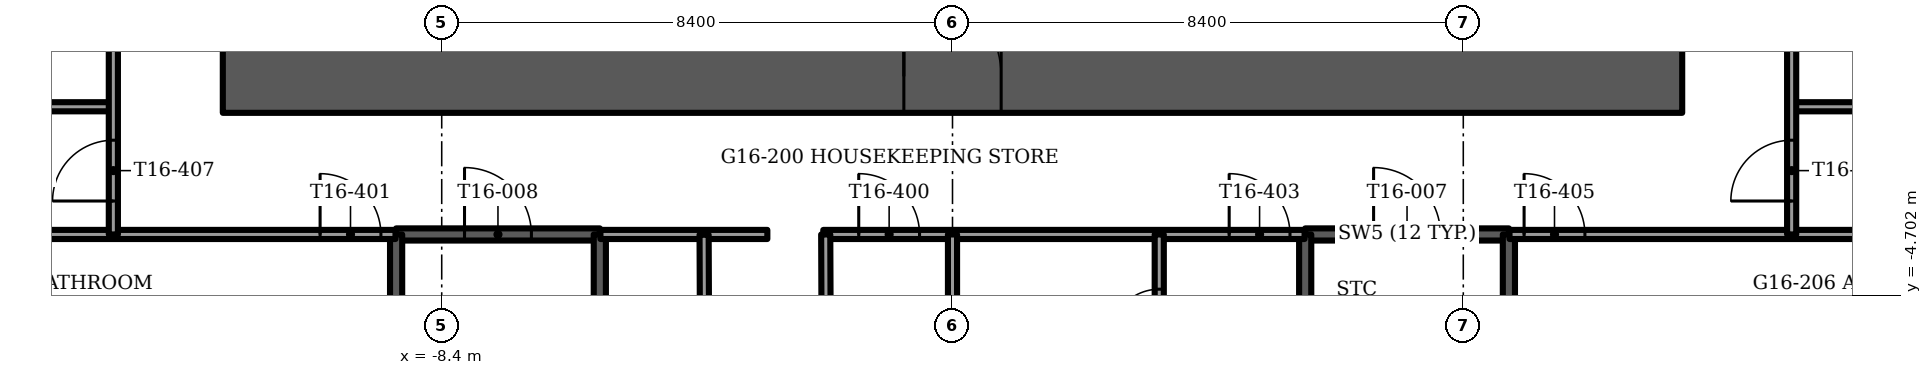
"""IFC4 building model, lengths in metres.
Left out: names, types, materials, properties, quantities, classifications, styles, units other than length and angle.
Written with IfcOpenShell. Run it as: python <this file> out.ifc"""

import sys

from ifc_helpers import new_model, si_unit, direction, frame, frame_2d, origin, place, context, subcontext, project, spatial, rectangle, extrude, element, fill, save


model = new_model("IFC4")
c1 = context("Model", 3, precision=1e-05, world=origin(), true_north=direction((0.0, 1.0)))
c2 = subcontext(c1, "Body", "Model", "MODEL_VIEW")
j1 = project(units=[si_unit("LENGTHUNIT", "METRE"), si_unit("PLANEANGLEUNIT", "RADIAN")], contexts=[c1])
p1 = place(None, origin())
s1 = spatial("IfcSite", under=j1, at=p1, CompositionType="ELEMENT")
p2 = place(p1, origin())
s2 = spatial("IfcBuilding", under=s1, at=p2, CompositionType="ELEMENT")
p3 = place(p2, frame((0.0, 0.0, 65.5)))
s3 = spatial("IfcBuildingStorey", under=s2, at=p3, CompositionType="ELEMENT", Elevation=65.5)
p4 = place(p3, frame((-12.0, -1.1, -0.3), z_axis=(0.0, 0.0, 1.0), x_axis=(1.0, 0.0, 0.0)))
e1 = element("IfcWall", 1, at=p4, inside=s3, PredefinedType="SHEAR", context=c2, shape_type="SweptSolid", body=[
    extrude(rectangle(XDim=24.0, YDim=1.2, at=frame_2d((12.0, 0.0))), origin(), (0.0, 0.0, 1.0), 3.75),
])
p5 = place(p4, frame((11.2, 0.0, 0.0)))
e2 = element("IfcOpeningElement", 2, at=p5, cuts=e1, PredefinedType="OPENING", context=c2, shape_type="SweptSolid", body=[
    extrude(rectangle(XDim=1.6, YDim=2.1, at=frame_2d((0.8, 1.05))), frame((0.0, 0.6, 0.0), z_axis=(0.0, -1.0, 0.0), x_axis=(1.0, 0.0, 0.0)), (0.0, 0.0, 1.0), 1.2),
])
p6 = place(p3, frame((-20.496, -1.351, 0.0), z_axis=(0.0, 0.0, 1.0), x_axis=(0.500010091595, -0.866019577321, 0.0)))
e3 = element("IfcWall", 3, at=p6, inside=s3, PredefinedType="SOLIDWALL", context=c2, shape_type="SweptSolid", body=[
    extrude(rectangle(XDim=11.633, YDim=0.15, at=frame_2d((5.816, 0.0))), origin(), (0.0, 0.0, 1.0), 3.45),
])
p7 = place(p6, frame((0.978, 0.0, 0.15)))
e4 = element("IfcOpeningElement", 4, at=p7, cuts=e3, PredefinedType="OPENING", context=c2, shape_type="SweptSolid", body=[
    extrude(rectangle(XDim=0.9, YDim=2.2, at=frame_2d((0.45, 1.1))), frame((0.0, 0.075, 0.0), z_axis=(0.0, -1.0, 0.0), x_axis=(1.0, 0.0, 0.0)), (0.0, 0.0, 1.0), 0.15),
])
p8 = place(p6, frame((3.078, 0.0, 0.15)))
e5 = element("IfcOpeningElement", 5, at=p8, cuts=e3, PredefinedType="OPENING", context=c2, shape_type="SweptSolid", body=[
    extrude(rectangle(XDim=1.5, YDim=2.2, at=frame_2d((0.75, 1.1))), frame((0.0, 0.075, 0.0), z_axis=(0.0, -1.0, 0.0), x_axis=(1.0, 0.0, 0.0)), (0.0, 0.0, 1.0), 0.15),
])
p9 = place(p6, frame((6.501, 0.0, 0.15)))
e6 = element("IfcOpeningElement", 6, at=p9, cuts=e3, PredefinedType="OPENING", context=c2, shape_type="SweptSolid", body=[
    extrude(rectangle(XDim=1.8, YDim=2.2, at=frame_2d((0.9, 1.1))), frame((0.0, 0.075, 0.0), z_axis=(0.0, -1.0, 0.0), x_axis=(1.0, 0.0, 0.0)), (0.0, 0.0, 1.0), 0.15),
])
p10 = place(p3, frame((14.679, -11.425, 0.0), z_axis=(0.0, 0.0, 1.0), x_axis=(0.500010091595, 0.866019577321, 0.0)))
e7 = element("IfcWall", 7, at=p10, inside=s3, PredefinedType="SOLIDWALL", context=c2, shape_type="SweptSolid", body=[
    extrude(rectangle(XDim=11.633, YDim=0.15, at=frame_2d((5.816, 0.0))), origin(), (0.0, 0.0, 1.0), 3.45),
])
p11 = place(p10, frame((3.632, 0.0, 0.15)))
e8 = element("IfcOpeningElement", 8, at=p11, cuts=e7, PredefinedType="OPENING", context=c2, shape_type="SweptSolid", body=[
    extrude(rectangle(XDim=1.5, YDim=2.2, at=frame_2d((0.75, 1.1))), frame((0.0, 0.075, 0.0), z_axis=(0.0, -1.0, 0.0), x_axis=(1.0, 0.0, 0.0)), (0.0, 0.0, 1.0), 0.15),
])
p12 = place(p10, frame((9.296, 0.0, 0.15)))
e9 = element("IfcOpeningElement", 9, at=p12, cuts=e7, PredefinedType="OPENING", context=c2, shape_type="SweptSolid", body=[
    extrude(rectangle(XDim=0.9, YDim=2.2, at=frame_2d((0.45, 1.1))), frame((0.0, 0.075, 0.0), z_axis=(0.0, -1.0, 0.0), x_axis=(1.0, 0.0, 0.0)), (0.0, 0.0, 1.0), 0.15),
])
p13 = place(p10, frame((7.096, 0.0, 0.15)))
e10 = element("IfcOpeningElement", 10, at=p13, cuts=e7, PredefinedType="OPENING", context=c2, shape_type="SweptSolid", body=[
    extrude(rectangle(XDim=1.5, YDim=2.2, at=frame_2d((0.75, 1.1))), frame((0.0, 0.075, 0.0), z_axis=(0.0, -1.0, 0.0), x_axis=(1.0, 0.0, 0.0)), (0.0, 0.0, 1.0), 0.15),
])
p14 = place(p3, frame((5.8, -3.7, -0.3), z_axis=(0.0, 0.0, 1.0), x_axis=(1.0, 0.0, 0.0)))
e11 = element("IfcWall", 11, at=p14, inside=s3, PredefinedType="SOLIDWALL", context=c2, shape_type="SweptSolid", body=[
    extrude(rectangle(XDim=3.35, YDim=0.2, at=frame_2d((1.675, 0.0))), origin(), (0.0, 0.0, 1.0), 3.75),
])
p15 = place(p14, frame((1.125, 0.0, 0.0)))
e12 = element("IfcOpeningElement", 12, at=p15, cuts=e11, PredefinedType="OPENING", context=c2, shape_type="SweptSolid", body=[
    extrude(rectangle(XDim=1.1, YDim=2.1, at=frame_2d((0.55, 1.05))), frame((0.0, 0.1, 0.0), z_axis=(0.0, -1.0, 0.0), x_axis=(1.0, 0.0, 0.0)), (0.0, 0.0, 1.0), 0.2),
])
for number, where, z_axis, x_axis in (
    (13, (5.8, -3.7, -0.3), (0.0, 0.0, 1.0), (0.0, -1.0, 0.0)),
    (14, (9.15, -3.7, -0.3), (0.0, 0.0, 1.0), (0.0, -1.0, 0.0)),
):
    element("IfcWall", number, at=place(p3, frame(where, z_axis=z_axis, x_axis=x_axis)), inside=s3, PredefinedType="SOLIDWALL", context=c2, shape_type="SweptSolid", body=[
        extrude(rectangle(XDim=7.7, YDim=0.2, at=frame_2d((3.85, 0.0))), origin(), (0.0, 0.0, 1.0), 3.75),
    ])
p16 = place(p3, frame((-9.15, -3.7, -0.3), z_axis=(0.0, 0.0, 1.0), x_axis=(1.0, 0.0, 0.0)))
e15 = element("IfcWall", 15, at=p16, inside=s3, PredefinedType="SOLIDWALL", context=c2, shape_type="SweptSolid", body=[
    extrude(rectangle(XDim=3.35, YDim=0.2, at=frame_2d((1.675, 0.0))), origin(), (0.0, 0.0, 1.0), 3.75),
])
p17 = place(p16, frame((1.125, 0.0, 0.0)))
e16 = element("IfcOpeningElement", 16, at=p17, cuts=e15, PredefinedType="OPENING", context=c2, shape_type="SweptSolid", body=[
    extrude(rectangle(XDim=1.1, YDim=2.1, at=frame_2d((0.55, 1.05))), frame((0.0, 0.1, 0.0), z_axis=(0.0, -1.0, 0.0), x_axis=(1.0, 0.0, 0.0)), (0.0, 0.0, 1.0), 0.2),
])
for number, where, z_axis, x_axis in (
    (17, (-9.15, -3.7, -0.3), (0.0, 0.0, 1.0), (0.0, -1.0, 0.0)),
    (18, (-5.8, -3.7, -0.3), (0.0, 0.0, 1.0), (0.0, -1.0, 0.0)),
):
    element("IfcWall", number, at=place(p3, frame(where, z_axis=z_axis, x_axis=x_axis)), inside=s3, PredefinedType="SOLIDWALL", context=c2, shape_type="SweptSolid", body=[
        extrude(rectangle(XDim=7.7, YDim=0.2, at=frame_2d((3.85, 0.0))), origin(), (0.0, 0.0, 1.0), 3.75),
    ])
p18 = place(p3, frame((-19.191, -3.7, 0.0), z_axis=(0.0, 0.0, 1.0), x_axis=(1.0, 0.0, 0.0)))
e19 = element("IfcWall", 19, at=p18, inside=s3, PredefinedType="PARTITIONING", context=c2, shape_type="SweptSolid", body=[
    extrude(rectangle(XDim=10.031, YDim=0.15, at=frame_2d((5.016, 0.0))), origin(), (0.0, 0.0, 1.0), 3.45),
])
p19 = place(p18, frame((8.791, 0.0, 0.0)))
e20 = element("IfcOpeningElement", 20, at=p19, cuts=e19, PredefinedType="OPENING", context=c2, shape_type="SweptSolid", body=[
    extrude(rectangle(XDim=1.0, YDim=2.1, at=frame_2d((0.5, 1.05))), frame((0.0, 0.075, 0.0), z_axis=(0.0, -1.0, 0.0), x_axis=(1.0, 0.0, 0.0)), (0.0, 0.0, 1.0), 0.15),
])
p20 = place(p3, frame((-5.79, -3.7, 0.0), z_axis=(0.0, 0.0, 1.0), x_axis=(1.0, 0.0, 0.0)))
e21 = element("IfcWall", 21, at=p20, inside=s3, PredefinedType="PARTITIONING", context=c2, shape_type="SweptSolid", body=[
    extrude(rectangle(XDim=2.745, YDim=0.15, at=frame_2d((1.373, 0.0))), origin(), (0.0, 0.0, 1.0), 3.45),
])
p21 = place(p3, frame((-2.125, -3.7, 0.0), z_axis=(0.0, 0.0, 1.0), x_axis=(1.0, 0.0, 0.0)))
e22 = element("IfcWall", 22, at=p21, inside=s3, PredefinedType="PARTITIONING", context=c2, shape_type="SweptSolid", body=[
    extrude(rectangle(XDim=7.915, YDim=0.15, at=frame_2d((3.958, 0.0))), origin(), (0.0, 0.0, 1.0), 3.45),
])
p22 = place(p21, frame((0.583, 0.0, 0.0)))
e23 = element("IfcOpeningElement", 23, at=p22, cuts=e22, PredefinedType="OPENING", context=c2, shape_type="SweptSolid", body=[
    extrude(rectangle(XDim=1.0, YDim=2.1, at=frame_2d((0.5, 1.05))), frame((0.0, 0.075, 0.0), z_axis=(0.0, -1.0, 0.0), x_axis=(1.0, 0.0, 0.0)), (0.0, 0.0, 1.0), 0.15),
])
p23 = place(p21, frame((6.675, 0.0, 0.0)))
e24 = element("IfcOpeningElement", 24, at=p23, cuts=e22, PredefinedType="OPENING", context=c2, shape_type="SweptSolid", body=[
    extrude(rectangle(XDim=1.0, YDim=2.1, at=frame_2d((0.5, 1.05))), frame((0.0, 0.075, 0.0), z_axis=(0.0, -1.0, 0.0), x_axis=(1.0, 0.0, 0.0)), (0.0, 0.0, 1.0), 0.15),
])
p24 = place(p3, frame((9.16, -3.7, 0.0), z_axis=(0.0, 0.0, 1.0), x_axis=(1.0, 0.0, 0.0)))
e25 = element("IfcWall", 25, at=p24, inside=s3, PredefinedType="PARTITIONING", context=c2, shape_type="SweptSolid", body=[
    extrude(rectangle(XDim=10.031, YDim=0.15, at=frame_2d((5.016, 0.0))), origin(), (0.0, 0.0, 1.0), 3.45),
])
p25 = place(p24, frame((0.24, 0.0, 0.0)))
e26 = element("IfcOpeningElement", 26, at=p25, cuts=e25, PredefinedType="OPENING", context=c2, shape_type="SweptSolid", body=[
    extrude(rectangle(XDim=1.0, YDim=2.1, at=frame_2d((0.5, 1.05))), frame((0.0, 0.075, 0.0), z_axis=(0.0, -1.0, 0.0), x_axis=(1.0, 0.0, 0.0)), (0.0, 0.0, 1.0), 0.15),
])
for number, where, z_axis, x_axis in (
    (27, (-20.404, -1.6, 0.0), (0.0, 0.0, 1.0), (1.0, 0.0, 0.0)),
    (28, (13.8, -1.6, 0.0), (0.0, 0.0, 1.0), (1.0, 0.0, 0.0)),
):
    element("IfcWall", number, at=place(p3, frame(where, z_axis=z_axis, x_axis=x_axis)), inside=s3, PredefinedType="PARTITIONING", context=c2, shape_type="SweptSolid", body=[
        extrude(rectangle(XDim=6.604, YDim=0.15, at=frame_2d((3.302, 0.0))), origin(), (0.0, 0.0, 1.0), 3.45),
    ])
p26 = place(p3, frame((13.8, -3.7, 0.0), z_axis=(0.0, 0.0, 1.0), x_axis=(0.0, 1.0, 0.0)))
e29 = element("IfcWall", 29, at=p26, inside=s3, PredefinedType="PARTITIONING", context=c2, shape_type="SweptSolid", body=[
    extrude(rectangle(XDim=11.415, YDim=0.15, at=frame_2d((5.708, 0.0))), origin(), (0.0, 0.0, 1.0), 3.45),
])
p27 = place(p26, frame((0.55, 0.0, 0.0)))
e30 = element("IfcOpeningElement", 30, at=p27, cuts=e29, PredefinedType="OPENING", context=c2, shape_type="SweptSolid", body=[
    extrude(rectangle(XDim=1.0, YDim=2.1, at=frame_2d((0.5, 1.05))), frame((0.0, 0.075, 0.0), z_axis=(0.0, -1.0, 0.0), x_axis=(1.0, 0.0, 0.0)), (0.0, 0.0, 1.0), 0.15),
])
p28 = place(p26, frame((3.175, 0.0, 0.0)))
e31 = element("IfcOpeningElement", 31, at=p28, cuts=e29, PredefinedType="OPENING", context=c2, shape_type="SweptSolid", body=[
    extrude(rectangle(XDim=1.0, YDim=2.1, at=frame_2d((0.5, 1.05))), frame((0.0, 0.075, 0.0), z_axis=(0.0, -1.0, 0.0), x_axis=(1.0, 0.0, 0.0)), (0.0, 0.0, 1.0), 0.15),
])
p29 = place(p26, frame((7.832, 0.0, 0.0)))
e32 = element("IfcOpeningElement", 32, at=p29, cuts=e29, PredefinedType="OPENING", context=c2, shape_type="SweptSolid", body=[
    extrude(rectangle(XDim=1.0, YDim=2.1, at=frame_2d((0.5, 1.05))), frame((0.0, 0.075, 0.0), z_axis=(0.0, -1.0, 0.0), x_axis=(1.0, 0.0, 0.0)), (0.0, 0.0, 1.0), 0.15),
])
p30 = place(p3, frame((3.4, -6.3, 0.0), z_axis=(0.0, 0.0, 1.0), x_axis=(0.0, 1.0, 0.0)))
e33 = element("IfcWall", 33, at=p30, inside=s3, PredefinedType="PARTITIONING", context=c2, shape_type="SweptSolid", body=[
    extrude(rectangle(XDim=2.6, YDim=0.15, at=frame_2d((1.3, 0.0))), origin(), (0.0, 0.0, 1.0), 3.45),
])
p31 = place(p30, frame((0.9, 0.0, 0.0)))
e34 = element("IfcOpeningElement", 34, at=p31, cuts=e33, PredefinedType="OPENING", context=c2, shape_type="SweptSolid", body=[
    extrude(rectangle(XDim=0.8, YDim=2.1, at=frame_2d((0.4, 1.05))), frame((0.0, 0.075, 0.0), z_axis=(0.0, -1.0, 0.0), x_axis=(1.0, 0.0, 0.0)), (0.0, 0.0, 1.0), 0.15),
])
p32 = place(p3, frame((0.0, -9.68, 0.0), z_axis=(0.0, 0.0, 1.0), x_axis=(0.0, 1.0, 0.0)))
e35 = element("IfcWall", 35, at=p32, inside=s3, PredefinedType="PARTITIONING", context=c2, shape_type="SweptSolid", body=[
    extrude(rectangle(XDim=5.98, YDim=0.15, at=frame_2d((2.99, 0.0))), origin(), (0.0, 0.0, 1.0), 3.45),
])
p33 = place(p3, frame((-13.8, -3.7, 0.0), z_axis=(0.0, 0.0, 1.0), x_axis=(0.0, 1.0, 0.0)))
e36 = element("IfcWall", 36, at=p33, inside=s3, PredefinedType="PARTITIONING", context=c2, shape_type="SweptSolid", body=[
    extrude(rectangle(XDim=11.415, YDim=0.15, at=frame_2d((5.708, 0.0))), origin(), (0.0, 0.0, 1.0), 3.45),
])
p34 = place(p33, frame((0.55, 0.0, 0.0)))
e37 = element("IfcOpeningElement", 37, at=p34, cuts=e36, PredefinedType="OPENING", context=c2, shape_type="SweptSolid", body=[
    extrude(rectangle(XDim=1.0, YDim=2.1, at=frame_2d((0.5, 1.05))), frame((0.0, 0.075, 0.0), z_axis=(0.0, -1.0, 0.0), x_axis=(1.0, 0.0, 0.0)), (0.0, 0.0, 1.0), 0.15),
])
p35 = place(p33, frame((5.05, 0.0, 0.0)))
e38 = element("IfcOpeningElement", 38, at=p35, cuts=e36, PredefinedType="OPENING", context=c2, shape_type="SweptSolid", body=[
    extrude(rectangle(XDim=1.0, YDim=2.1, at=frame_2d((0.5, 1.05))), frame((0.0, 0.075, 0.0), z_axis=(0.0, -1.0, 0.0), x_axis=(1.0, 0.0, 0.0)), (0.0, 0.0, 1.0), 0.15),
])
p36 = place(p33, frame((8.358, 0.0, 0.0)))
e39 = element("IfcOpeningElement", 39, at=p36, cuts=e36, PredefinedType="OPENING", context=c2, shape_type="SweptSolid", body=[
    extrude(rectangle(XDim=1.0, YDim=2.1, at=frame_2d((0.5, 1.05))), frame((0.0, 0.075, 0.0), z_axis=(0.0, -1.0, 0.0), x_axis=(1.0, 0.0, 0.0)), (0.0, 0.0, 1.0), 0.15),
])
p37 = place(p3, frame((-2.061, -9.54, 0.0), z_axis=(0.0, 0.0, 1.0), x_axis=(-0.004096784315, 0.999991608144, 0.0)))
e40 = element("IfcWall", 40, at=p37, inside=s3, PredefinedType="PARTITIONING", context=c2, shape_type="SweptSolid", body=[
    extrude(rectangle(XDim=5.84, YDim=0.15, at=frame_2d((2.92, 0.0))), origin(), (0.0, 0.0, 1.0), 3.45),
])
p38 = place(p3, frame((-4.061, -9.54, 0.0), z_axis=(0.0, 0.0, 1.0), x_axis=(-0.004100383939, 0.99999159339, 0.0)))
e41 = element("IfcWall", 41, at=p38, inside=s3, PredefinedType="PARTITIONING", context=c2, shape_type="SweptSolid", body=[
    extrude(rectangle(XDim=5.835, YDim=0.15, at=frame_2d((2.917, 0.0))), origin(), (0.0, 0.0, 1.0), 3.45),
])
p39 = place(p5, origin())
e42 = element("IfcDoor", 42, at=p39, inside=s3, OperationType="DOUBLE_DOOR_SINGLE_SWING", PredefinedType="DOOR", context=c2, shape_type="SweptSolid", body=[
    extrude(rectangle(XDim=1.6, YDim=2.1, at=frame_2d((0.8, 1.05))), frame((0.0, 0.025, 0.0), z_axis=(0.0, -1.0, 0.0), x_axis=(1.0, 0.0, 0.0)), (0.0, 0.0, 1.0), 0.05),
])
fill(e2, e42)
p40 = place(p15, origin())
e43 = element("IfcDoor", 43, at=p40, inside=s3, OperationType="SINGLE_SWING_LEFT", PredefinedType="DOOR", context=c2, shape_type="SweptSolid", body=[
    extrude(rectangle(XDim=1.1, YDim=2.1, at=frame_2d((0.55, 1.05))), frame((0.0, 0.025, 0.0), z_axis=(0.0, -1.0, 0.0), x_axis=(1.0, 0.0, 0.0)), (0.0, 0.0, 1.0), 0.05),
])
fill(e12, e43)
p41 = place(p17, origin())
e44 = element("IfcDoor", 44, at=p41, inside=s3, OperationType="SINGLE_SWING_LEFT", PredefinedType="DOOR", context=c2, shape_type="SweptSolid", body=[
    extrude(rectangle(XDim=1.1, YDim=2.1, at=frame_2d((0.55, 1.05))), frame((0.0, 0.025, 0.0), z_axis=(0.0, -1.0, 0.0), x_axis=(1.0, 0.0, 0.0)), (0.0, 0.0, 1.0), 0.05),
])
fill(e16, e44)
p42 = place(p22, origin())
e45 = element("IfcDoor", 45, at=p42, inside=s3, OperationType="SINGLE_SWING_RIGHT", PredefinedType="DOOR", context=c2, shape_type="SweptSolid", body=[
    extrude(rectangle(XDim=1.0, YDim=2.1, at=frame_2d((0.5, 1.05))), frame((0.0, 0.025, 0.0), z_axis=(0.0, -1.0, 0.0), x_axis=(1.0, 0.0, 0.0)), (0.0, 0.0, 1.0), 0.05),
])
fill(e23, e45)
p43 = place(p19, origin())
e46 = element("IfcDoor", 46, at=p43, inside=s3, OperationType="SINGLE_SWING_RIGHT", PredefinedType="DOOR", context=c2, shape_type="SweptSolid", body=[
    extrude(rectangle(XDim=1.0, YDim=2.1, at=frame_2d((0.5, 1.05))), frame((0.0, 0.025, 0.0), z_axis=(0.0, -1.0, 0.0), x_axis=(1.0, 0.0, 0.0)), (0.0, 0.0, 1.0), 0.05),
])
fill(e20, e46)
p44 = place(p23, origin())
e47 = element("IfcDoor", 47, at=p44, inside=s3, OperationType="SINGLE_SWING_RIGHT", PredefinedType="DOOR", context=c2, shape_type="SweptSolid", body=[
    extrude(rectangle(XDim=1.0, YDim=2.1, at=frame_2d((0.5, 1.05))), frame((0.0, 0.025, 0.0), z_axis=(0.0, -1.0, 0.0), x_axis=(1.0, 0.0, 0.0)), (0.0, 0.0, 1.0), 0.05),
])
fill(e24, e47)
p45 = place(p31, origin())
e48 = element("IfcDoor", 48, at=p45, inside=s3, OperationType="SINGLE_SWING_RIGHT", PredefinedType="DOOR", context=c2, shape_type="SweptSolid", body=[
    extrude(rectangle(XDim=0.8, YDim=2.1, at=frame_2d((0.4, 1.05))), frame((0.0, 0.025, 0.0), z_axis=(0.0, -1.0, 0.0), x_axis=(1.0, 0.0, 0.0)), (0.0, 0.0, 1.0), 0.05),
])
fill(e34, e48)
p46 = place(p25, origin())
e49 = element("IfcDoor", 49, at=p46, inside=s3, OperationType="SINGLE_SWING_LEFT", PredefinedType="DOOR", context=c2, shape_type="SweptSolid", body=[
    extrude(rectangle(XDim=1.0, YDim=2.1, at=frame_2d((0.5, 1.05))), frame((0.0, 0.025, 0.0), z_axis=(0.0, -1.0, 0.0), x_axis=(1.0, 0.0, 0.0)), (0.0, 0.0, 1.0), 0.05),
])
fill(e26, e49)
p47 = place(p34, origin())
e50 = element("IfcDoor", 50, at=p47, inside=s3, OperationType="SINGLE_SWING_LEFT", PredefinedType="DOOR", context=c2, shape_type="SweptSolid", body=[
    extrude(rectangle(XDim=1.0, YDim=2.1, at=frame_2d((0.5, 1.05))), frame((0.0, 0.025, 0.0), z_axis=(0.0, -1.0, 0.0), x_axis=(1.0, 0.0, 0.0)), (0.0, 0.0, 1.0), 0.05),
])
fill(e37, e50)
p48 = place(p27, origin())
e51 = element("IfcDoor", 51, at=p48, inside=s3, OperationType="SINGLE_SWING_LEFT", PredefinedType="DOOR", context=c2, shape_type="SweptSolid", body=[
    extrude(rectangle(XDim=1.0, YDim=2.1, at=frame_2d((0.5, 1.05))), frame((0.0, 0.025, 0.0), z_axis=(0.0, -1.0, 0.0), x_axis=(1.0, 0.0, 0.0)), (0.0, 0.0, 1.0), 0.05),
])
fill(e30, e51)
save(model, sys.argv[1])
